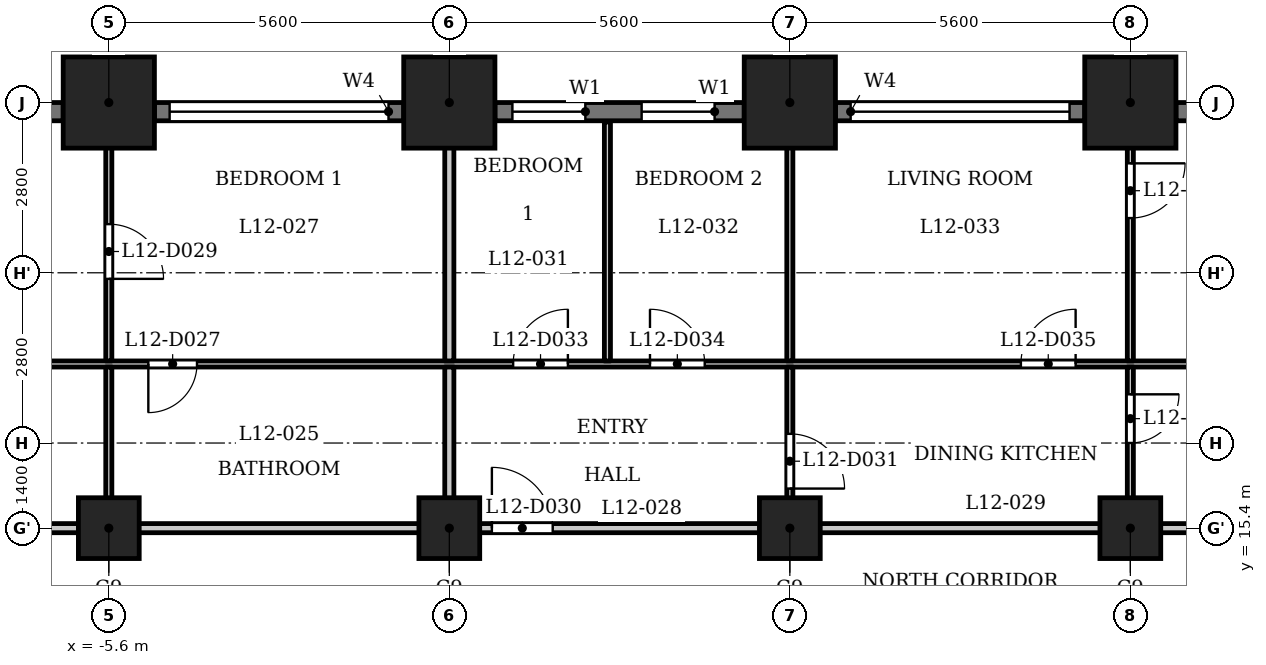
"""IFC4 building model, lengths in metres.
Left out: names, types, materials, properties, quantities, classifications, styles, units other than length and angle.
Written with IfcOpenShell. Run it as: python <this file> out.ifc"""

import sys

from ifc_helpers import new_model, si_unit, direction, frame, frame_2d, origin, origin_2d, place, context, subcontext, project, spatial, rectangle, extrude, element, fill, save


model = new_model("IFC4")
c1 = context("Model", 3, precision=1e-05, world=origin(), true_north=direction((0.0, 1.0)))
c2 = subcontext(c1, "Body", "Model", "MODEL_VIEW")
j1 = project(units=[si_unit("LENGTHUNIT", "METRE"), si_unit("PLANEANGLEUNIT", "RADIAN")], contexts=[c1])
p1 = place(None, origin())
s1 = spatial("IfcSite", under=j1, at=p1, CompositionType="ELEMENT")
p2 = place(p1, origin())
s2 = spatial("IfcBuilding", under=s1, at=p2, CompositionType="ELEMENT")
p3 = place(p2, frame((0.0, 0.0, 51.5)))
s3 = spatial("IfcBuildingStorey", under=s2, at=p3, CompositionType="ELEMENT", Elevation=51.5)
for number, where, z_axis, x_axis in (
    (1, (11.2, 22.4, 0.0), (0.0, 0.0, 1.0), (1.0, 0.0, 0.0)),
    (2, (5.6, 22.4, 0.0), (0.0, 0.0, 1.0), (1.0, 0.0, 0.0)),
    (3, (0.0, 22.4, 0.0), (0.0, 0.0, 1.0), (1.0, 0.0, 0.0)),
    (4, (-5.6, 22.4, 0.0), (0.0, 0.0, 1.0), (1.0, 0.0, 0.0)),
):
    element("IfcColumn", number, at=place(p3, frame(where, z_axis=z_axis, x_axis=x_axis)), inside=s3, PredefinedType="COLUMN", context=c2, shape_type="SweptSolid", body=[
        extrude(rectangle(XDim=1.5, YDim=1.5, at=origin_2d()), origin(), (0.0, 0.0, 1.0), 3.5),
    ])
for number, where, z_axis, x_axis in (
    (5, (-5.6, 15.4, 0.0), (0.0, 0.0, 1.0), (1.0, 0.0, 0.0)),
    (6, (0.0, 15.4, 0.0), (0.0, 0.0, 1.0), (1.0, 0.0, 0.0)),
    (7, (5.6, 15.4, 0.0), (0.0, 0.0, 1.0), (1.0, 0.0, 0.0)),
    (8, (11.2, 15.4, 0.0), (0.0, 0.0, 1.0), (1.0, 0.0, 0.0)),
):
    element("IfcColumn", number, at=place(p3, frame(where, z_axis=z_axis, x_axis=x_axis)), inside=s3, PredefinedType="COLUMN", context=c2, shape_type="SweptSolid", body=[
        extrude(rectangle(XDim=1.0, YDim=1.0, at=origin_2d()), origin(), (0.0, 0.0, 1.0), 3.5),
    ])
p4 = place(p3, frame((16.05, 22.25, 0.0), z_axis=(0.0, 0.0, 1.0), x_axis=(-1.0, 0.0, 0.0)))
e9 = element("IfcWall", 9, at=p4, inside=s3, PredefinedType="SOLIDWALL", context=c2, shape_type="SweptSolid", body=[
    extrude(rectangle(XDim=4.1, YDim=0.3, at=frame_2d((2.05, 0.0))), origin(), (0.0, 0.0, 1.0), 2.35),
])
p5 = place(p4, frame((0.25, 0.0, 1.2)))
e10 = element("IfcOpeningElement", 10, at=p5, cuts=e9, PredefinedType="OPENING", context=c2, shape_type="SweptSolid", body=[
    extrude(rectangle(XDim=3.6, YDim=0.95, at=frame_2d((1.8, 0.475))), frame((0.0, 0.16, 0.0), z_axis=(0.0, -1.0, 0.0), x_axis=(1.0, 0.0, 0.0)), (0.0, 0.0, 1.0), 0.32),
])
p6 = place(p3, frame((10.45, 22.25, 0.0), z_axis=(0.0, 0.0, 1.0), x_axis=(-1.0, 0.0, 0.0)))
e11 = element("IfcWall", 11, at=p6, inside=s3, PredefinedType="SOLIDWALL", context=c2, shape_type="SweptSolid", body=[
    extrude(rectangle(XDim=4.1, YDim=0.3, at=frame_2d((2.05, 0.0))), origin(), (0.0, 0.0, 1.0), 2.35),
])
p7 = place(p6, frame((0.25, 0.0, 1.2)))
e12 = element("IfcOpeningElement", 12, at=p7, cuts=e11, PredefinedType="OPENING", context=c2, shape_type="SweptSolid", body=[
    extrude(rectangle(XDim=3.6, YDim=0.95, at=frame_2d((1.8, 0.475))), frame((0.0, 0.16, 0.0), z_axis=(0.0, -1.0, 0.0), x_axis=(1.0, 0.0, 0.0)), (0.0, 0.0, 1.0), 0.32),
])
p8 = place(p3, frame((4.85, 22.25, 0.0), z_axis=(0.0, 0.0, 1.0), x_axis=(-1.0, 0.0, 0.0)))
e13 = element("IfcWall", 13, at=p8, inside=s3, PredefinedType="SOLIDWALL", context=c2, shape_type="SweptSolid", body=[
    extrude(rectangle(XDim=4.1, YDim=0.3, at=frame_2d((2.05, 0.0))), origin(), (0.0, 0.0, 1.0), 2.35),
])
p9 = place(p8, frame((0.488, 0.0, 0.6)))
e14 = element("IfcOpeningElement", 14, at=p9, cuts=e13, PredefinedType="OPENING", context=c2, shape_type="SweptSolid", body=[
    extrude(rectangle(XDim=1.2, YDim=1.55, at=frame_2d((0.6, 0.775))), frame((0.0, 0.16, 0.0), z_axis=(0.0, -1.0, 0.0), x_axis=(1.0, 0.0, 0.0)), (0.0, 0.0, 1.0), 0.32),
])
p10 = place(p8, frame((2.613, 0.0, 0.6)))
e15 = element("IfcOpeningElement", 15, at=p10, cuts=e13, PredefinedType="OPENING", context=c2, shape_type="SweptSolid", body=[
    extrude(rectangle(XDim=1.2, YDim=1.55, at=frame_2d((0.6, 0.775))), frame((0.0, 0.16, 0.0), z_axis=(0.0, -1.0, 0.0), x_axis=(1.0, 0.0, 0.0)), (0.0, 0.0, 1.0), 0.32),
])
p11 = place(p3, frame((-0.75, 22.25, 0.0), z_axis=(0.0, 0.0, 1.0), x_axis=(-1.0, 0.0, 0.0)))
e16 = element("IfcWall", 16, at=p11, inside=s3, PredefinedType="SOLIDWALL", context=c2, shape_type="SweptSolid", body=[
    extrude(rectangle(XDim=4.1, YDim=0.3, at=frame_2d((2.05, 0.0))), origin(), (0.0, 0.0, 1.0), 2.35),
])
p12 = place(p11, frame((0.25, 0.0, 1.2)))
e17 = element("IfcOpeningElement", 17, at=p12, cuts=e16, PredefinedType="OPENING", context=c2, shape_type="SweptSolid", body=[
    extrude(rectangle(XDim=3.6, YDim=0.95, at=frame_2d((1.8, 0.475))), frame((0.0, 0.16, 0.0), z_axis=(0.0, -1.0, 0.0), x_axis=(1.0, 0.0, 0.0)), (0.0, 0.0, 1.0), 0.32),
])
p13 = place(p3, frame((-6.35, 22.25, 0.0), z_axis=(0.0, 0.0, 1.0), x_axis=(-1.0, 0.0, 0.0)))
e18 = element("IfcWall", 18, at=p13, inside=s3, PredefinedType="SOLIDWALL", context=c2, shape_type="SweptSolid", body=[
    extrude(rectangle(XDim=4.1, YDim=0.3, at=frame_2d((2.05, 0.0))), origin(), (0.0, 0.0, 1.0), 2.35),
])
p14 = place(p13, frame((0.75, 0.0, 0.9)))
e19 = element("IfcOpeningElement", 19, at=p14, cuts=e18, PredefinedType="OPENING", context=c2, shape_type="SweptSolid", body=[
    extrude(rectangle(XDim=2.6, YDim=1.25, at=frame_2d((1.3, 0.625))), frame((0.0, 0.16, 0.0), z_axis=(0.0, -1.0, 0.0), x_axis=(1.0, 0.0, 0.0)), (0.0, 0.0, 1.0), 0.32),
])
p15 = place(p3, frame((-27.484, 15.4, 0.0), z_axis=(0.0, 0.0, 1.0), x_axis=(1.0, 0.0, 0.0)))
e20 = element("IfcWall", 20, at=p15, inside=s3, PredefinedType="PARTITIONING", context=c2, shape_type="SweptSolid", body=[
    extrude(rectangle(XDim=54.968, YDim=0.15, at=frame_2d((27.484, 0.0))), origin(), (0.0, 0.0, 1.0), 3.2),
])
p16 = place(p15, frame((8.784, 0.0, 0.0)))
e21 = element("IfcOpeningElement", 21, at=p16, cuts=e20, PredefinedType="OPENING", context=c2, shape_type="SweptSolid", body=[
    extrude(rectangle(XDim=1.0, YDim=2.1, at=frame_2d((0.5, 1.05))), frame((0.0, 0.085, 0.0), z_axis=(0.0, -1.0, 0.0), x_axis=(1.0, 0.0, 0.0)), (0.0, 0.0, 1.0), 0.17),
])
p17 = place(p15, frame((12.034, 0.0, 0.0)))
e22 = element("IfcOpeningElement", 22, at=p17, cuts=e20, PredefinedType="OPENING", context=c2, shape_type="SweptSolid", body=[
    extrude(rectangle(XDim=1.0, YDim=2.1, at=frame_2d((0.5, 1.05))), frame((0.0, 0.085, 0.0), z_axis=(0.0, -1.0, 0.0), x_axis=(1.0, 0.0, 0.0)), (0.0, 0.0, 1.0), 0.17),
])
p18 = place(p15, frame((16.984, 0.0, 0.0)))
e23 = element("IfcOpeningElement", 23, at=p18, cuts=e20, PredefinedType="OPENING", context=c2, shape_type="SweptSolid", body=[
    extrude(rectangle(XDim=1.0, YDim=2.1, at=frame_2d((0.5, 1.05))), frame((0.0, 0.085, 0.0), z_axis=(0.0, -1.0, 0.0), x_axis=(1.0, 0.0, 0.0)), (0.0, 0.0, 1.0), 0.17),
])
p19 = place(p15, frame((28.184, 0.0, 0.0)))
e24 = element("IfcOpeningElement", 24, at=p19, cuts=e20, PredefinedType="OPENING", context=c2, shape_type="SweptSolid", body=[
    extrude(rectangle(XDim=1.0, YDim=2.1, at=frame_2d((0.5, 1.05))), frame((0.0, 0.085, 0.0), z_axis=(0.0, -1.0, 0.0), x_axis=(1.0, 0.0, 0.0)), (0.0, 0.0, 1.0), 0.17),
])
p20 = place(p15, frame((48.234, 0.0, 0.0)))
e25 = element("IfcOpeningElement", 25, at=p20, cuts=e20, PredefinedType="OPENING", context=c2, shape_type="SweptSolid", body=[
    extrude(rectangle(XDim=1.0, YDim=2.1, at=frame_2d((0.5, 1.05))), frame((0.0, 0.085, 0.0), z_axis=(0.0, -1.0, 0.0), x_axis=(1.0, 0.0, 0.0)), (0.0, 0.0, 1.0), 0.17),
])
p21 = place(p3, frame((-26.44, 18.1, 0.0), z_axis=(0.0, 0.0, 1.0), x_axis=(1.0, 0.0, 0.0)))
e26 = element("IfcWall", 26, at=p21, inside=s3, PredefinedType="PARTITIONING", context=c2, shape_type="SweptSolid", body=[
    extrude(rectangle(XDim=52.63, YDim=0.1, at=frame_2d((26.315, 0.0))), origin(), (0.0, 0.0, 1.0), 3.2),
])
p22 = place(p21, frame((2.626, 0.0, 0.0)))
e27 = element("IfcOpeningElement", 27, at=p22, cuts=e26, PredefinedType="OPENING", context=c2, shape_type="SweptSolid", body=[
    extrude(rectangle(XDim=0.8, YDim=2.1, at=frame_2d((0.4, 1.05))), frame((0.0, 0.06, 0.0), z_axis=(0.0, -1.0, 0.0), x_axis=(1.0, 0.0, 0.0)), (0.0, 0.0, 1.0), 0.12),
])
p23 = place(p21, frame((7.84, 0.0, 0.0)))
e28 = element("IfcOpeningElement", 28, at=p23, cuts=e26, PredefinedType="OPENING", context=c2, shape_type="SweptSolid", body=[
    extrude(rectangle(XDim=0.9, YDim=2.1, at=frame_2d((0.45, 1.05))), frame((0.0, 0.06, 0.0), z_axis=(0.0, -1.0, 0.0), x_axis=(1.0, 0.0, 0.0)), (0.0, 0.0, 1.0), 0.12),
])
p24 = place(p21, frame((13.79, 0.0, 0.0)))
e29 = element("IfcOpeningElement", 29, at=p24, cuts=e26, PredefinedType="OPENING", context=c2, shape_type="SweptSolid", body=[
    extrude(rectangle(XDim=0.8, YDim=2.1, at=frame_2d((0.4, 1.05))), frame((0.0, 0.06, 0.0), z_axis=(0.0, -1.0, 0.0), x_axis=(1.0, 0.0, 0.0)), (0.0, 0.0, 1.0), 0.12),
])
p25 = place(p21, frame((11.09, 0.0, 0.0)))
e30 = element("IfcOpeningElement", 30, at=p25, cuts=e26, PredefinedType="OPENING", context=c2, shape_type="SweptSolid", body=[
    extrude(rectangle(XDim=0.9, YDim=2.1, at=frame_2d((0.45, 1.05))), frame((0.0, 0.06, 0.0), z_axis=(0.0, -1.0, 0.0), x_axis=(1.0, 0.0, 0.0)), (0.0, 0.0, 1.0), 0.12),
])
p26 = place(p21, frame((21.49, 0.0, 0.0)))
e31 = element("IfcOpeningElement", 31, at=p26, cuts=e26, PredefinedType="OPENING", context=c2, shape_type="SweptSolid", body=[
    extrude(rectangle(XDim=0.8, YDim=2.1, at=frame_2d((0.4, 1.05))), frame((0.0, 0.06, 0.0), z_axis=(0.0, -1.0, 0.0), x_axis=(1.0, 0.0, 0.0)), (0.0, 0.0, 1.0), 0.12),
])
p27 = place(p21, frame((15.79, 0.0, 0.0)))
e32 = element("IfcOpeningElement", 32, at=p27, cuts=e26, PredefinedType="OPENING", context=c2, shape_type="SweptSolid", body=[
    extrude(rectangle(XDim=0.9, YDim=2.1, at=frame_2d((0.45, 1.05))), frame((0.0, 0.06, 0.0), z_axis=(0.0, -1.0, 0.0), x_axis=(1.0, 0.0, 0.0)), (0.0, 0.0, 1.0), 0.12),
])
p28 = place(p21, frame((27.49, 0.0, 0.0)))
e33 = element("IfcOpeningElement", 33, at=p28, cuts=e26, PredefinedType="OPENING", context=c2, shape_type="SweptSolid", body=[
    extrude(rectangle(XDim=0.9, YDim=2.1, at=frame_2d((0.45, 1.05))), frame((0.0, 0.06, 0.0), z_axis=(0.0, -1.0, 0.0), x_axis=(1.0, 0.0, 0.0)), (0.0, 0.0, 1.0), 0.12),
])
p29 = place(p21, frame((29.74, 0.0, 0.0)))
e34 = element("IfcOpeningElement", 34, at=p29, cuts=e26, PredefinedType="OPENING", context=c2, shape_type="SweptSolid", body=[
    extrude(rectangle(XDim=0.9, YDim=2.1, at=frame_2d((0.45, 1.05))), frame((0.0, 0.06, 0.0), z_axis=(0.0, -1.0, 0.0), x_axis=(1.0, 0.0, 0.0)), (0.0, 0.0, 1.0), 0.12),
])
p30 = place(p21, frame((35.84, 0.0, 0.0)))
e35 = element("IfcOpeningElement", 35, at=p30, cuts=e26, PredefinedType="OPENING", context=c2, shape_type="SweptSolid", body=[
    extrude(rectangle(XDim=0.9, YDim=2.1, at=frame_2d((0.45, 1.05))), frame((0.0, 0.06, 0.0), z_axis=(0.0, -1.0, 0.0), x_axis=(1.0, 0.0, 0.0)), (0.0, 0.0, 1.0), 0.12),
])
p31 = place(p21, frame((50.74, 0.0, 0.0)))
e36 = element("IfcOpeningElement", 36, at=p31, cuts=e26, PredefinedType="OPENING", context=c2, shape_type="SweptSolid", body=[
    extrude(rectangle(XDim=0.8, YDim=2.1, at=frame_2d((0.4, 1.05))), frame((0.0, 0.06, 0.0), z_axis=(0.0, -1.0, 0.0), x_axis=(1.0, 0.0, 0.0)), (0.0, 0.0, 1.0), 0.12),
])
p32 = place(p21, frame((47.29, 0.0, 0.0)))
e37 = element("IfcOpeningElement", 37, at=p32, cuts=e26, PredefinedType="OPENING", context=c2, shape_type="SweptSolid", body=[
    extrude(rectangle(XDim=0.9, YDim=2.1, at=frame_2d((0.45, 1.05))), frame((0.0, 0.06, 0.0), z_axis=(0.0, -1.0, 0.0), x_axis=(1.0, 0.0, 0.0)), (0.0, 0.0, 1.0), 0.12),
])
p33 = place(p3, frame((-5.6, 15.475, 0.0), z_axis=(0.0, 0.0, 1.0), x_axis=(0.0, 1.0, 0.0)))
e38 = element("IfcWall", 38, at=p33, inside=s3, PredefinedType="PARTITIONING", context=c2, shape_type="SweptSolid", body=[
    extrude(rectangle(XDim=2.575, YDim=0.1, at=frame_2d((1.288, 0.0))), origin(), (0.0, 0.0, 1.0), 3.2),
])
p34 = place(p3, frame((-5.6, 18.15, 0.0), z_axis=(0.0, 0.0, 1.0), x_axis=(0.0, 1.0, 0.0)))
e39 = element("IfcWall", 39, at=p34, inside=s3, PredefinedType="PARTITIONING", context=c2, shape_type="SweptSolid", body=[
    extrude(rectangle(XDim=4.98, YDim=0.1, at=frame_2d((2.49, 0.0))), origin(), (0.0, 0.0, 1.0), 3.2),
])
p35 = place(p34, frame((1.35, 0.0, 0.0)))
e40 = element("IfcOpeningElement", 40, at=p35, cuts=e39, PredefinedType="OPENING", context=c2, shape_type="SweptSolid", body=[
    extrude(rectangle(XDim=0.9, YDim=2.1, at=frame_2d((0.45, 1.05))), frame((0.0, 0.06, 0.0), z_axis=(0.0, -1.0, 0.0), x_axis=(1.0, 0.0, 0.0)), (0.0, 0.0, 1.0), 0.12),
])
p36 = place(p3, frame((0.0, 15.475, 0.0), z_axis=(0.0, 0.0, 1.0), x_axis=(0.0, 1.0, 0.0)))
e41 = element("IfcWall", 41, at=p36, inside=s3, PredefinedType="PARTITIONING", context=c2, shape_type="SweptSolid", body=[
    extrude(rectangle(XDim=2.575, YDim=0.15, at=frame_2d((1.288, 0.0))), origin(), (0.0, 0.0, 1.0), 3.2),
])
p37 = place(p3, frame((0.0, 18.15, 0.0), z_axis=(0.0, 0.0, 1.0), x_axis=(0.0, 1.0, 0.0)))
e42 = element("IfcWall", 42, at=p37, inside=s3, PredefinedType="PARTITIONING", context=c2, shape_type="SweptSolid", body=[
    extrude(rectangle(XDim=4.98, YDim=0.15, at=frame_2d((2.49, 0.0))), origin(), (0.0, 0.0, 1.0), 3.2),
])
p38 = place(p3, frame((2.6, 18.15, 0.0), z_axis=(0.0, 0.0, 1.0), x_axis=(0.0, 1.0, 0.0)))
e43 = element("IfcWall", 43, at=p38, inside=s3, PredefinedType="PARTITIONING", context=c2, shape_type="SweptSolid", body=[
    extrude(rectangle(XDim=3.93, YDim=0.1, at=frame_2d((1.965, 0.0))), origin(), (0.0, 0.0, 1.0), 3.2),
])
p39 = place(p3, frame((5.6, 15.475, 0.0), z_axis=(0.0, 0.0, 1.0), x_axis=(0.0, 1.0, 0.0)))
e44 = element("IfcWall", 44, at=p39, inside=s3, PredefinedType="PARTITIONING", context=c2, shape_type="SweptSolid", body=[
    extrude(rectangle(XDim=2.575, YDim=0.1, at=frame_2d((1.288, 0.0))), origin(), (0.0, 0.0, 1.0), 3.2),
])
p40 = place(p39, frame((0.576, 0.0, 0.0)))
e45 = element("IfcOpeningElement", 45, at=p40, cuts=e44, PredefinedType="OPENING", context=c2, shape_type="SweptSolid", body=[
    extrude(rectangle(XDim=0.9, YDim=2.1, at=frame_2d((0.45, 1.05))), frame((0.0, 0.06, 0.0), z_axis=(0.0, -1.0, 0.0), x_axis=(1.0, 0.0, 0.0)), (0.0, 0.0, 1.0), 0.12),
])
p41 = place(p3, frame((5.6, 18.15, 0.0), z_axis=(0.0, 0.0, 1.0), x_axis=(0.0, 1.0, 0.0)))
e46 = element("IfcWall", 46, at=p41, inside=s3, PredefinedType="PARTITIONING", context=c2, shape_type="SweptSolid", body=[
    extrude(rectangle(XDim=4.98, YDim=0.1, at=frame_2d((2.49, 0.0))), origin(), (0.0, 0.0, 1.0), 3.2),
])
p42 = place(p3, frame((11.2, 15.475, 0.0), z_axis=(0.0, 0.0, 1.0), x_axis=(0.0, 1.0, 0.0)))
e47 = element("IfcWall", 47, at=p42, inside=s3, PredefinedType="PARTITIONING", context=c2, shape_type="SweptSolid", body=[
    extrude(rectangle(XDim=2.575, YDim=0.1, at=frame_2d((1.288, 0.0))), origin(), (0.0, 0.0, 1.0), 3.2),
])
p43 = place(p42, frame((1.326, 0.0, 0.0)))
e48 = element("IfcOpeningElement", 48, at=p43, cuts=e47, PredefinedType="OPENING", context=c2, shape_type="SweptSolid", body=[
    extrude(rectangle(XDim=0.8, YDim=2.1, at=frame_2d((0.4, 1.05))), frame((0.0, 0.06, 0.0), z_axis=(0.0, -1.0, 0.0), x_axis=(1.0, 0.0, 0.0)), (0.0, 0.0, 1.0), 0.12),
])
p44 = place(p3, frame((11.2, 18.15, 0.0), z_axis=(0.0, 0.0, 1.0), x_axis=(0.0, 1.0, 0.0)))
e49 = element("IfcWall", 49, at=p44, inside=s3, PredefinedType="PARTITIONING", context=c2, shape_type="SweptSolid", body=[
    extrude(rectangle(XDim=4.98, YDim=0.1, at=frame_2d((2.49, 0.0))), origin(), (0.0, 0.0, 1.0), 3.2),
])
p45 = place(p44, frame((2.35, 0.0, 0.0)))
e50 = element("IfcOpeningElement", 50, at=p45, cuts=e49, PredefinedType="OPENING", context=c2, shape_type="SweptSolid", body=[
    extrude(rectangle(XDim=0.9, YDim=2.1, at=frame_2d((0.45, 1.05))), frame((0.0, 0.06, 0.0), z_axis=(0.0, -1.0, 0.0), x_axis=(1.0, 0.0, 0.0)), (0.0, 0.0, 1.0), 0.12),
])
p46 = place(p26, origin())
e51 = element("IfcDoor", 51, at=p46, inside=s3, OperationType="SINGLE_SWING_LEFT", PredefinedType="DOOR", context=c2, shape_type="SweptSolid", body=[
    extrude(rectangle(XDim=0.8, YDim=2.1, at=frame_2d((0.4, 1.05))), frame((0.0, 0.025, 0.0), z_axis=(0.0, -1.0, 0.0), x_axis=(1.0, 0.0, 0.0)), (0.0, 0.0, 1.0), 0.05),
])
fill(e31, e51)
p47 = place(p35, origin())
e52 = element("IfcDoor", 52, at=p47, inside=s3, OperationType="SINGLE_SWING_LEFT", PredefinedType="DOOR", context=c2, shape_type="SweptSolid", body=[
    extrude(rectangle(XDim=0.9, YDim=2.1, at=frame_2d((0.45, 1.05))), frame((0.0, 0.025, 0.0), z_axis=(0.0, -1.0, 0.0), x_axis=(1.0, 0.0, 0.0)), (0.0, 0.0, 1.0), 0.05),
])
fill(e40, e52)
p48 = place(p19, origin())
e53 = element("IfcDoor", 53, at=p48, inside=s3, OperationType="SINGLE_SWING_RIGHT", PredefinedType="DOOR", context=c2, shape_type="SweptSolid", body=[
    extrude(rectangle(XDim=1.0, YDim=2.1, at=frame_2d((0.5, 1.05))), frame((0.0, 0.025, 0.0), z_axis=(0.0, -1.0, 0.0), x_axis=(1.0, 0.0, 0.0)), (0.0, 0.0, 1.0), 0.05),
])
fill(e24, e53)
p49 = place(p40, origin())
e54 = element("IfcDoor", 54, at=p49, inside=s3, OperationType="SINGLE_SWING_LEFT", PredefinedType="DOOR", context=c2, shape_type="SweptSolid", body=[
    extrude(rectangle(XDim=0.9, YDim=2.1, at=frame_2d((0.45, 1.05))), frame((0.0, 0.025, 0.0), z_axis=(0.0, -1.0, 0.0), x_axis=(1.0, 0.0, 0.0)), (0.0, 0.0, 1.0), 0.05),
])
fill(e45, e54)
p50 = place(p43, origin())
e55 = element("IfcDoor", 55, at=p50, inside=s3, OperationType="SINGLE_SWING_RIGHT", PredefinedType="DOOR", context=c2, shape_type="SweptSolid", body=[
    extrude(rectangle(XDim=0.8, YDim=2.1, at=frame_2d((0.4, 1.05))), frame((0.0, 0.025, 0.0), z_axis=(0.0, -1.0, 0.0), x_axis=(1.0, 0.0, 0.0)), (0.0, 0.0, 1.0), 0.05),
])
fill(e48, e55)
p51 = place(p28, origin())
e56 = element("IfcDoor", 56, at=p51, inside=s3, OperationType="SINGLE_SWING_LEFT", PredefinedType="DOOR", context=c2, shape_type="SweptSolid", body=[
    extrude(rectangle(XDim=0.9, YDim=2.1, at=frame_2d((0.45, 1.05))), frame((0.0, 0.025, 0.0), z_axis=(0.0, -1.0, 0.0), x_axis=(1.0, 0.0, 0.0)), (0.0, 0.0, 1.0), 0.05),
])
fill(e33, e56)
p52 = place(p29, origin())
e57 = element("IfcDoor", 57, at=p52, inside=s3, OperationType="SINGLE_SWING_RIGHT", PredefinedType="DOOR", context=c2, shape_type="SweptSolid", body=[
    extrude(rectangle(XDim=0.9, YDim=2.1, at=frame_2d((0.45, 1.05))), frame((0.0, 0.025, 0.0), z_axis=(0.0, -1.0, 0.0), x_axis=(1.0, 0.0, 0.0)), (0.0, 0.0, 1.0), 0.05),
])
fill(e34, e57)
p53 = place(p30, origin())
e58 = element("IfcDoor", 58, at=p53, inside=s3, OperationType="SINGLE_SWING_LEFT", PredefinedType="DOOR", context=c2, shape_type="SweptSolid", body=[
    extrude(rectangle(XDim=0.9, YDim=2.1, at=frame_2d((0.45, 1.05))), frame((0.0, 0.025, 0.0), z_axis=(0.0, -1.0, 0.0), x_axis=(1.0, 0.0, 0.0)), (0.0, 0.0, 1.0), 0.05),
])
fill(e35, e58)
p54 = place(p45, origin())
e59 = element("IfcDoor", 59, at=p54, inside=s3, OperationType="SINGLE_SWING_RIGHT", PredefinedType="DOOR", context=c2, shape_type="SweptSolid", body=[
    extrude(rectangle(XDim=0.9, YDim=2.1, at=frame_2d((0.45, 1.05))), frame((0.0, 0.025, 0.0), z_axis=(0.0, -1.0, 0.0), x_axis=(1.0, 0.0, 0.0)), (0.0, 0.0, 1.0), 0.05),
])
fill(e50, e59)
p55 = place(p7, origin())
e60 = element("IfcWindow", 60, at=p55, inside=s3, PartitioningType="SINGLE_PANEL", PredefinedType="WINDOW", context=c2, shape_type="SweptSolid", body=[
    extrude(rectangle(XDim=3.6, YDim=0.95, at=frame_2d((1.8, 0.475))), frame((0.0, 0.03, 0.0), z_axis=(0.0, -1.0, 0.0), x_axis=(1.0, 0.0, 0.0)), (0.0, 0.0, 1.0), 0.06),
])
fill(e12, e60)
p56 = place(p9, origin())
e61 = element("IfcWindow", 61, at=p56, inside=s3, PartitioningType="SINGLE_PANEL", PredefinedType="WINDOW", context=c2, shape_type="SweptSolid", body=[
    extrude(rectangle(XDim=1.2, YDim=1.55, at=frame_2d((0.6, 0.775))), frame((0.0, 0.03, 0.0), z_axis=(0.0, -1.0, 0.0), x_axis=(1.0, 0.0, 0.0)), (0.0, 0.0, 1.0), 0.06),
])
fill(e14, e61)
p57 = place(p10, origin())
e62 = element("IfcWindow", 62, at=p57, inside=s3, PartitioningType="SINGLE_PANEL", PredefinedType="WINDOW", context=c2, shape_type="SweptSolid", body=[
    extrude(rectangle(XDim=1.2, YDim=1.55, at=frame_2d((0.6, 0.775))), frame((0.0, 0.03, 0.0), z_axis=(0.0, -1.0, 0.0), x_axis=(1.0, 0.0, 0.0)), (0.0, 0.0, 1.0), 0.06),
])
fill(e15, e62)
p58 = place(p12, origin())
e63 = element("IfcWindow", 63, at=p58, inside=s3, PartitioningType="SINGLE_PANEL", PredefinedType="WINDOW", context=c2, shape_type="SweptSolid", body=[
    extrude(rectangle(XDim=3.6, YDim=0.95, at=frame_2d((1.8, 0.475))), frame((0.0, 0.03, 0.0), z_axis=(0.0, -1.0, 0.0), x_axis=(1.0, 0.0, 0.0)), (0.0, 0.0, 1.0), 0.06),
])
fill(e17, e63)
save(model, sys.argv[1])
